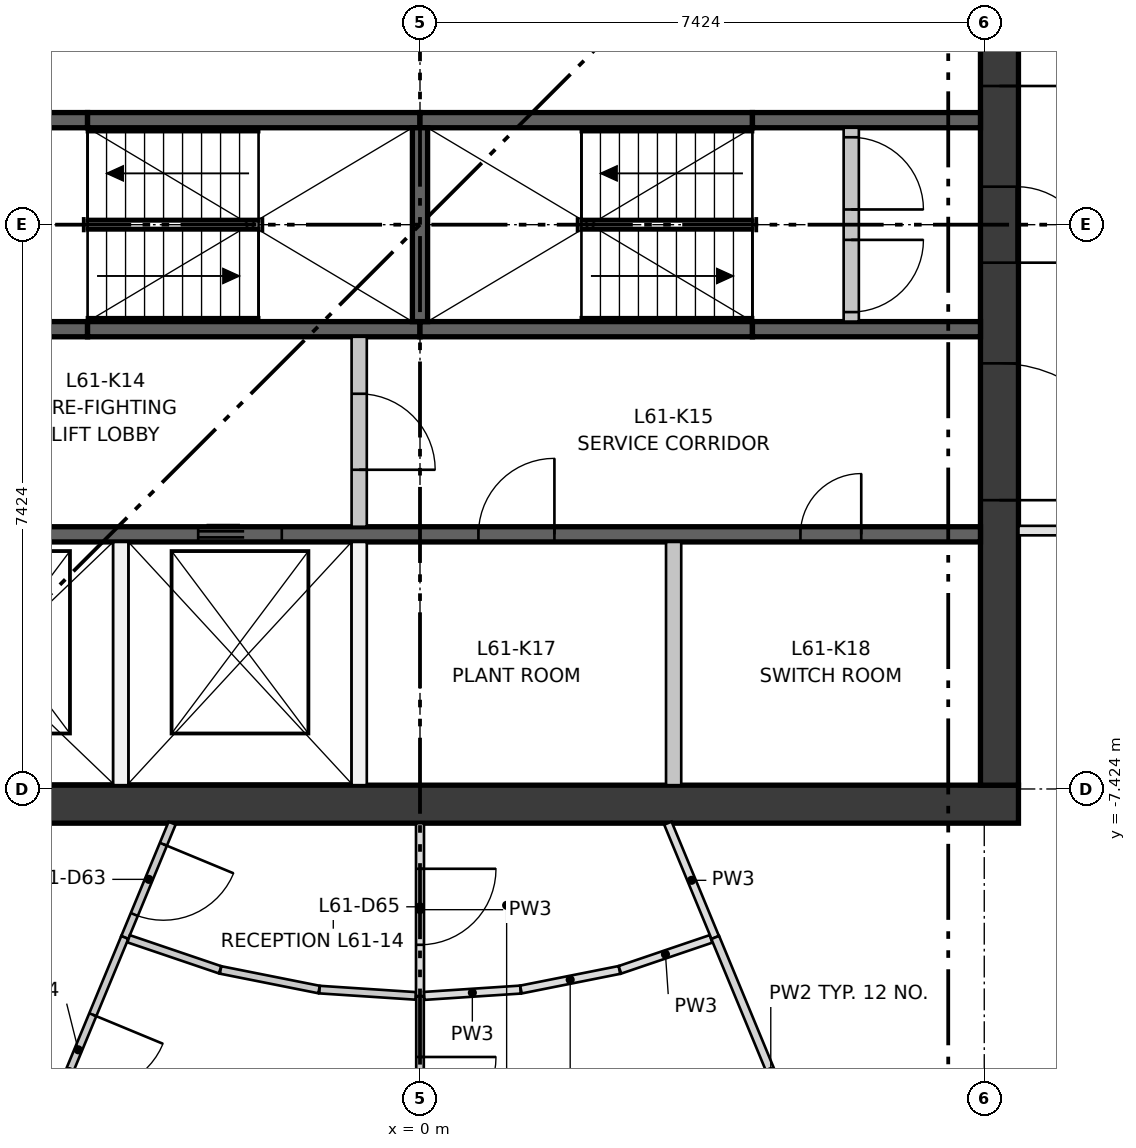
"""IFC4 building model, lengths in metres.
Left out: names, types, materials, properties, quantities, classifications, styles, units other than length and angle.
Written with IfcOpenShell. Run it as: python <this file> out.ifc"""

import sys

from ifc_helpers import new_model, si_unit, direction, frame, frame_2d, origin, place, context, subcontext, project, spatial, polyline, rectangle, outline, extrude, element, fill, save


model = new_model("IFC4")
c1 = context("Model", 3, precision=1e-05, world=origin(), true_north=direction((0.0, 1.0)))
c2 = subcontext(c1, "Body", "Model", "MODEL_VIEW")
j1 = project(units=[si_unit("LENGTHUNIT", "METRE"), si_unit("PLANEANGLEUNIT", "RADIAN")], contexts=[c1])
p1 = place(None, origin())
s1 = spatial("IfcSite", under=j1, at=p1, CompositionType="ELEMENT")
p2 = place(p1, origin())
s2 = spatial("IfcBuilding", under=s1, at=p2, CompositionType="ELEMENT")
p3 = place(p2, frame((0.0, 0.0, 224.5)))
s3 = spatial("IfcBuildingStorey", under=s2, at=p3, CompositionType="ELEMENT", Elevation=224.5)
p4 = place(p3, frame((-7.874, -7.624, 0.0), z_axis=(0.0, 0.0, 1.0), x_axis=(1.0, 0.0, 0.0)))
e1 = element("IfcWall", 1, at=p4, inside=s3, PredefinedType="SHEAR", context=c2, shape_type="SweptSolid", body=[
    extrude(rectangle(XDim=15.748, YDim=0.5, at=frame_2d((7.874, 0.0))), origin(), (0.0, 0.0, 1.0), 3.35),
])
p5 = place(p3, frame((7.624, -7.374, 0.0), z_axis=(0.0, 0.0, 1.0), x_axis=(0.0, 1.0, 0.0)))
e2 = element("IfcWall", 2, at=p5, inside=s3, PredefinedType="SHEAR", context=c2, shape_type="SweptSolid", body=[
    extrude(rectangle(XDim=14.748, YDim=0.5, at=frame_2d((7.374, 0.0))), origin(), (0.0, 0.0, 1.0), 3.35),
])
p6 = place(p5, frame((6.874, 0.0, 0.0)))
e3 = element("IfcOpeningElement", 3, at=p6, cuts=e2, PredefinedType="OPENING", context=c2, shape_type="SweptSolid", body=[
    extrude(rectangle(XDim=1.0, YDim=2.1, at=frame_2d((0.5, 1.05))), frame((0.0, 0.26, 0.0), z_axis=(0.0, -1.0, 0.0), x_axis=(1.0, 0.0, 0.0)), (0.0, 0.0, 1.0), 0.52),
])
p7 = place(p5, frame((3.75, 0.0, 0.0)))
e4 = element("IfcOpeningElement", 4, at=p7, cuts=e2, PredefinedType="OPENING", context=c2, shape_type="SweptSolid", body=[
    extrude(rectangle(XDim=1.8, YDim=2.1, at=frame_2d((0.9, 1.05))), frame((0.0, 0.26, 0.0), z_axis=(0.0, -1.0, 0.0), x_axis=(1.0, 0.0, 0.0)), (0.0, 0.0, 1.0), 0.52),
])
p8 = place(p5, frame((9.198, 0.0, 0.0)))
e5 = element("IfcOpeningElement", 5, at=p8, cuts=e2, PredefinedType="OPENING", context=c2, shape_type="SweptSolid", body=[
    extrude(rectangle(XDim=1.8, YDim=2.1, at=frame_2d((0.9, 1.05))), frame((0.0, 0.26, 0.0), z_axis=(0.0, -1.0, 0.0), x_axis=(1.0, 0.0, 0.0)), (0.0, 0.0, 1.0), 0.52),
])
p9 = place(p3, frame((-7.374, -4.074, 0.0), z_axis=(0.0, 0.0, 1.0), x_axis=(1.0, 0.0, 0.0)))
e6 = element("IfcWall", 6, at=p9, inside=s3, PredefinedType="SHEAR", context=c2, shape_type="SweptSolid", body=[
    extrude(rectangle(XDim=14.748, YDim=0.2, at=frame_2d((7.374, 0.0))), origin(), (0.0, 0.0, 1.0), 3.0),
])
p10 = place(p9, frame((1.319, 0.0, 0.0)))
e7 = element("IfcOpeningElement", 7, at=p10, cuts=e6, PredefinedType="OPENING", context=c2, shape_type="SweptSolid", body=[
    extrude(rectangle(XDim=1.1, YDim=2.1, at=frame_2d((0.55, 1.05))), frame((0.0, 0.11, 0.0), z_axis=(0.0, -1.0, 0.0), x_axis=(1.0, 0.0, 0.0)), (0.0, 0.0, 1.0), 0.22),
])
p11 = place(p9, frame((4.456, 0.0, 0.0)))
e8 = element("IfcOpeningElement", 8, at=p11, cuts=e6, PredefinedType="OPENING", context=c2, shape_type="SweptSolid", body=[
    extrude(rectangle(XDim=1.1, YDim=2.1, at=frame_2d((0.55, 1.05))), frame((0.0, 0.11, 0.0), z_axis=(0.0, -1.0, 0.0), x_axis=(1.0, 0.0, 0.0)), (0.0, 0.0, 1.0), 0.22),
])
p12 = place(p9, frame((8.143, 0.0, 0.0)))
e9 = element("IfcOpeningElement", 9, at=p12, cuts=e6, PredefinedType="OPENING", context=c2, shape_type="SweptSolid", body=[
    extrude(rectangle(XDim=1.0, YDim=2.1, at=frame_2d((0.5, 1.05))), frame((0.0, 0.11, 0.0), z_axis=(0.0, -1.0, 0.0), x_axis=(1.0, 0.0, 0.0)), (0.0, 0.0, 1.0), 0.22),
])
p13 = place(p9, frame((12.379, 0.0, 0.0)))
e10 = element("IfcOpeningElement", 10, at=p13, cuts=e6, PredefinedType="OPENING", context=c2, shape_type="SweptSolid", body=[
    extrude(rectangle(XDim=0.8, YDim=2.1, at=frame_2d((0.4, 1.05))), frame((0.0, 0.11, 0.0), z_axis=(0.0, -1.0, 0.0), x_axis=(1.0, 0.0, 0.0)), (0.0, 0.0, 1.0), 0.22),
])
p14 = place(p3, frame((-7.374, -1.375, 0.0), z_axis=(0.0, 0.0, 1.0), x_axis=(1.0, 0.0, 0.0)))
e11 = element("IfcWall", 11, at=p14, inside=s3, PredefinedType="SHEAR", context=c2, shape_type="SweptSolid", body=[
    extrude(rectangle(XDim=3.0, YDim=0.2, at=frame_2d((1.5, 0.0))), origin(), (0.0, 0.0, 1.0), 3.0),
])
for number, where, z_axis, x_axis in (
    (12, (-4.374, -1.375, 0.0), (0.0, 0.0, 1.0), (1.0, 0.0, 0.0)),
    (13, (0.0, -1.375, 0.0), (0.0, 0.0, 1.0), (1.0, 0.0, 0.0)),
):
    element("IfcWall", number, at=place(p3, frame(where, z_axis=z_axis, x_axis=x_axis)), inside=s3, PredefinedType="SHEAR", context=c2, shape_type="SweptSolid", body=[
        extrude(rectangle(XDim=4.374, YDim=0.2, at=frame_2d((2.187, 0.0))), origin(), (0.0, 0.0, 1.0), 3.0),
    ])
for number, where, z_axis, x_axis in (
    (14, (4.374, -1.375, 0.0), (0.0, 0.0, 1.0), (1.0, 0.0, 0.0)),
    (15, (-7.374, 1.375, 0.0), (0.0, 0.0, 1.0), (1.0, 0.0, 0.0)),
):
    element("IfcWall", number, at=place(p3, frame(where, z_axis=z_axis, x_axis=x_axis)), inside=s3, PredefinedType="SHEAR", context=c2, shape_type="SweptSolid", body=[
        extrude(rectangle(XDim=3.0, YDim=0.2, at=frame_2d((1.5, 0.0))), origin(), (0.0, 0.0, 1.0), 3.0),
    ])
for number, where, z_axis, x_axis in (
    (16, (-4.374, 1.375, 0.0), (0.0, 0.0, 1.0), (1.0, 0.0, 0.0)),
    (17, (0.0, 1.375, 0.0), (0.0, 0.0, 1.0), (1.0, 0.0, 0.0)),
):
    element("IfcWall", number, at=place(p3, frame(where, z_axis=z_axis, x_axis=x_axis)), inside=s3, PredefinedType="SHEAR", context=c2, shape_type="SweptSolid", body=[
        extrude(rectangle(XDim=4.374, YDim=0.2, at=frame_2d((2.187, 0.0))), origin(), (0.0, 0.0, 1.0), 3.0),
    ])
p15 = place(p3, frame((4.374, 1.375, 0.0), z_axis=(0.0, 0.0, 1.0), x_axis=(1.0, 0.0, 0.0)))
e18 = element("IfcWall", 18, at=p15, inside=s3, PredefinedType="SHEAR", context=c2, shape_type="SweptSolid", body=[
    extrude(rectangle(XDim=3.0, YDim=0.2, at=frame_2d((1.5, 0.0))), origin(), (0.0, 0.0, 1.0), 3.0),
])
p16 = place(p3, frame((0.0, -1.275, 0.0), z_axis=(0.0, 0.0, 1.0), x_axis=(0.0, 1.0, 0.0)))
e19 = element("IfcWall", 19, at=p16, inside=s3, PredefinedType="SHEAR", context=c2, shape_type="SweptSolid", body=[
    extrude(rectangle(XDim=2.55, YDim=0.2, at=frame_2d((1.275, 0.0))), origin(), (0.0, 0.0, 1.0), 3.0),
])
for number, where, z_axis, x_axis in (
    (20, (-3.937, -7.374, 0.0), (0.0, 0.0, 1.0), (0.0, 1.0, 0.0)),
    (21, (-0.8, -7.374, 0.0), (0.0, 0.0, 1.0), (0.0, 1.0, 0.0)),
):
    element("IfcWall", number, at=place(p3, frame(where, z_axis=z_axis, x_axis=x_axis)), inside=s3, PredefinedType="PARTITIONING", context=c2, shape_type="SweptSolid", body=[
        extrude(rectangle(XDim=3.2, YDim=0.2, at=frame_2d((1.6, 0.0))), origin(), (0.0, 0.0, 1.0), 3.0),
    ])
p17 = place(p3, frame((-0.8, -3.974, 0.0), z_axis=(0.0, 0.0, 1.0), x_axis=(0.0, 1.0, 0.0)))
e22 = element("IfcWall", 22, at=p17, inside=s3, PredefinedType="PARTITIONING", context=c2, shape_type="SweptSolid", body=[
    extrude(rectangle(XDim=2.499, YDim=0.2, at=frame_2d((1.25, 0.0))), origin(), (0.0, 0.0, 1.0), 3.0),
])
p18 = place(p17, frame((0.75, 0.0, 0.0)))
e23 = element("IfcOpeningElement", 23, at=p18, cuts=e22, PredefinedType="OPENING", context=c2, shape_type="SweptSolid", body=[
    extrude(rectangle(XDim=1.0, YDim=2.1, at=frame_2d((0.5, 1.05))), frame((0.0, 0.11, 0.0), z_axis=(0.0, -1.0, 0.0), x_axis=(1.0, 0.0, 0.0)), (0.0, 0.0, 1.0), 0.22),
])
p19 = place(p3, frame((3.337, -7.374, 0.0), z_axis=(0.0, 0.0, 1.0), x_axis=(0.0, 1.0, 0.0)))
e24 = element("IfcWall", 24, at=p19, inside=s3, PredefinedType="PARTITIONING", context=c2, shape_type="SweptSolid", body=[
    extrude(rectangle(XDim=3.2, YDim=0.2, at=frame_2d((1.6, 0.0))), origin(), (0.0, 0.0, 1.0), 3.0),
])
p20 = place(p3, frame((5.674, -1.275, 0.0), z_axis=(0.0, 0.0, 1.0), x_axis=(0.0, 1.0, 0.0)))
e25 = element("IfcWall", 25, at=p20, inside=s3, PredefinedType="PARTITIONING", context=c2, shape_type="SweptSolid", body=[
    extrude(rectangle(XDim=2.55, YDim=0.2, at=frame_2d((1.275, 0.0))), origin(), (0.0, 0.0, 1.0), 3.0),
])
p21 = place(p20, frame((0.125, 0.0, 0.0)))
e26 = element("IfcOpeningElement", 26, at=p21, cuts=e25, PredefinedType="OPENING", context=c2, shape_type="SweptSolid", body=[
    extrude(rectangle(XDim=0.95, YDim=2.1, at=frame_2d((0.475, 1.05))), frame((0.0, 0.11, 0.0), z_axis=(0.0, -1.0, 0.0), x_axis=(1.0, 0.0, 0.0)), (0.0, 0.0, 1.0), 0.22),
])
p22 = place(p20, frame((1.475, 0.0, 0.0)))
e27 = element("IfcOpeningElement", 27, at=p22, cuts=e25, PredefinedType="OPENING", context=c2, shape_type="SweptSolid", body=[
    extrude(rectangle(XDim=0.95, YDim=2.1, at=frame_2d((0.475, 1.05))), frame((0.0, 0.11, 0.0), z_axis=(0.0, -1.0, 0.0), x_axis=(1.0, 0.0, 0.0)), (0.0, 0.0, 1.0), 0.22),
])
p23 = place(p3, frame((8.643, -12.934, 0.0), z_axis=(0.619832994913, -0.755344730477, 0.212747259813), x_axis=(0.77304293478, 0.634353703321, -8.415613e-06)))
e28 = element("IfcWall", 28, at=p23, inside=s3, PredefinedType="SOLIDWALL", context=c2, shape_type="SweptSolid", body=[
    extrude(outline(polyline([(0.0, 0.0), (2.594, 0.0), (2.575, 0.921), (0.019, 0.921), (0.0, 0.0)])), origin(), (0.0, 0.0, -1.0), 0.3),
])
p24 = place(p3, frame((10.191, -4.024, 0.0), z_axis=(0.0, 0.0, 1.0), x_axis=(-1.0, 0.0, 0.0)))
e29 = element("IfcWall", 29, at=p24, inside=s3, PredefinedType="PARTITIONING", context=c2, shape_type="SweptSolid", body=[
    extrude(rectangle(XDim=2.317, YDim=0.125, at=frame_2d((1.158, 0.0))), origin(), (0.0, 0.0, 1.0), 3.0),
])
p25 = place(p24, frame((0.7, 0.0, 0.0)))
e30 = element("IfcOpeningElement", 30, at=p25, cuts=e29, PredefinedType="OPENING", context=c2, shape_type="SweptSolid", body=[
    extrude(rectangle(XDim=1.0, YDim=2.1, at=frame_2d((0.5, 1.05))), frame((0.0, 0.073, 0.0), z_axis=(0.0, -1.0, 0.0), x_axis=(1.0, 0.0, 0.0)), (0.0, 0.0, 1.0), 0.145),
])
p26 = place(p3, frame((-3.261, -7.874, 0.0), z_axis=(0.0, 0.0, 1.0), x_axis=(-0.382718376354, -0.923865057463, 0.0)))
e31 = element("IfcWall", 31, at=p26, inside=s3, PredefinedType="PARTITIONING", context=c2, shape_type="SweptSolid", body=[
    extrude(rectangle(XDim=1.627, YDim=0.1, at=frame_2d((0.813, 0.0))), origin(), (0.0, 0.0, 1.0), 3.0),
])
p27 = place(p26, frame((0.3, 0.0, 0.0)))
e32 = element("IfcOpeningElement", 32, at=p27, cuts=e31, PredefinedType="OPENING", context=c2, shape_type="SweptSolid", body=[
    extrude(rectangle(XDim=1.0, YDim=2.1, at=frame_2d((0.5, 1.05))), frame((0.0, 0.06, 0.0), z_axis=(0.0, -1.0, 0.0), x_axis=(1.0, 0.0, 0.0)), (0.0, 0.0, 1.0), 0.12),
])
p28 = place(p3, frame((-3.884, -9.377, 0.0), z_axis=(0.0, 0.0, 1.0), x_axis=(-0.382713052283, -0.923867262983, 0.0)))
e33 = element("IfcWall", 33, at=p28, inside=s3, PredefinedType="PARTITIONING", context=c2, shape_type="SweptSolid", body=[
    extrude(rectangle(XDim=3.82, YDim=0.1, at=frame_2d((1.91, 0.0))), origin(), (0.0, 0.0, 1.0), 3.0),
])
p29 = place(p28, frame((1.1, 0.0, 0.0)))
e34 = element("IfcOpeningElement", 34, at=p29, cuts=e33, PredefinedType="OPENING", context=c2, shape_type="SweptSolid", body=[
    extrude(rectangle(XDim=1.0, YDim=2.1, at=frame_2d((0.5, 1.05))), frame((0.0, 0.06, 0.0), z_axis=(0.0, -1.0, 0.0), x_axis=(1.0, 0.0, 0.0)), (0.0, 0.0, 1.0), 0.12),
])
p30 = place(p3, frame((-2.63, -9.803, 0.0), z_axis=(0.0, 0.0, 1.0), x_axis=(-0.946940072487, 0.321410172706, 0.0)))
e35 = element("IfcWall", 35, at=p30, inside=s3, PredefinedType="PARTITIONING", context=c2, shape_type="SweptSolid", body=[
    extrude(rectangle(XDim=1.271, YDim=0.1, at=frame_2d((0.635, 0.0))), origin(), (0.0, 0.0, 1.0), 3.0),
])
p31 = place(p3, frame((-1.328, -10.062, 0.0), z_axis=(0.0, 0.0, 1.0), x_axis=(-0.980779158075, 0.195121098517, 0.0)))
e36 = element("IfcWall", 36, at=p31, inside=s3, PredefinedType="PARTITIONING", context=c2, shape_type="SweptSolid", body=[
    extrude(rectangle(XDim=1.321, YDim=0.1, at=frame_2d((0.661, 0.0))), origin(), (0.0, 0.0, 1.0), 3.0),
])
p32 = place(p3, frame((-0.056, -10.146, 0.0), z_axis=(0.0, 0.0, 1.0), x_axis=(-0.997868677089, 0.065254143814, 0.0)))
e37 = element("IfcWall", 37, at=p32, inside=s3, PredefinedType="PARTITIONING", context=c2, shape_type="SweptSolid", body=[
    extrude(rectangle(XDim=1.268, YDim=0.1, at=frame_2d((0.634, 0.0))), origin(), (0.0, 0.0, 1.0), 3.0),
])
p33 = place(p3, frame((0.0, -7.874, 0.0), z_axis=(0.0, 0.0, 1.0), x_axis=(0.0, -1.0, 0.0)))
e38 = element("IfcWall", 38, at=p33, inside=s3, PredefinedType="PARTITIONING", context=c2, shape_type="SweptSolid", body=[
    extrude(rectangle(XDim=2.276, YDim=0.105, at=frame_2d((1.138, 0.0))), origin(), (0.0, 0.0, 1.0), 3.0),
])
p34 = place(p33, frame((0.6, 0.0, 0.0)))
e39 = element("IfcOpeningElement", 39, at=p34, cuts=e38, PredefinedType="OPENING", context=c2, shape_type="SweptSolid", body=[
    extrude(rectangle(XDim=1.0, YDim=2.1, at=frame_2d((0.5, 1.05))), frame((0.0, 0.062, 0.0), z_axis=(0.0, -1.0, 0.0), x_axis=(1.0, 0.0, 0.0)), (0.0, 0.0, 1.0), 0.125),
])
p35 = place(p3, frame((0.0, -10.15, 0.0), z_axis=(0.0, 0.0, 1.0), x_axis=(0.0, -1.0, 0.0)))
e40 = element("IfcWall", 40, at=p35, inside=s3, PredefinedType="PARTITIONING", context=c2, shape_type="SweptSolid", body=[
    extrude(rectangle(XDim=3.82, YDim=0.1, at=frame_2d((1.91, 0.0))), origin(), (0.0, 0.0, 1.0), 3.0),
])
p36 = place(p35, frame((0.8, 0.0, 0.0)))
e41 = element("IfcOpeningElement", 41, at=p36, cuts=e40, PredefinedType="OPENING", context=c2, shape_type="SweptSolid", body=[
    extrude(rectangle(XDim=1.0, YDim=2.1, at=frame_2d((0.5, 1.05))), frame((0.0, 0.06, 0.0), z_axis=(0.0, -1.0, 0.0), x_axis=(1.0, 0.0, 0.0)), (0.0, 0.0, 1.0), 0.12),
])
p37 = place(p3, frame((1.321, -10.063, 0.0), z_axis=(0.0, 0.0, 1.0), x_axis=(-0.99786785721, -0.065266680223, 0.0)))
e42 = element("IfcWall", 42, at=p37, inside=s3, PredefinedType="PARTITIONING", context=c2, shape_type="SweptSolid", body=[
    extrude(rectangle(XDim=1.268, YDim=0.105, at=frame_2d((0.634, 0.0))), origin(), (0.0, 0.0, 1.0), 3.0),
])
p38 = place(p3, frame((2.624, -9.805, 0.0), z_axis=(0.0, 0.0, 1.0), x_axis=(-0.980765080918, -0.195191844223, 0.0)))
e43 = element("IfcWall", 43, at=p38, inside=s3, PredefinedType="PARTITIONING", context=c2, shape_type="SweptSolid", body=[
    extrude(rectangle(XDim=1.321, YDim=0.105, at=frame_2d((0.66, 0.0))), origin(), (0.0, 0.0, 1.0), 3.0),
])
p39 = place(p3, frame((3.829, -9.396, 0.0), z_axis=(0.0, 0.0, 1.0), x_axis=(-0.946932566751, -0.321432285291, 0.0)))
e44 = element("IfcWall", 44, at=p39, inside=s3, PredefinedType="PARTITIONING", context=c2, shape_type="SweptSolid", body=[
    extrude(rectangle(XDim=1.265, YDim=0.105, at=frame_2d((0.633, 0.0))), origin(), (0.0, 0.0, 1.0), 3.0),
])
p40 = place(p3, frame((3.261, -7.874, 0.0), z_axis=(0.0, 0.0, 1.0), x_axis=(0.382718376354, -0.923865057463, 0.0)))
e45 = element("IfcWall", 45, at=p40, inside=s3, PredefinedType="PARTITIONING", context=c2, shape_type="SweptSolid", body=[
    extrude(rectangle(XDim=1.627, YDim=0.105, at=frame_2d((0.813, 0.0))), origin(), (0.0, 0.0, 1.0), 3.0),
])
p41 = place(p3, frame((3.884, -9.377, 0.0), z_axis=(0.0, 0.0, 1.0), x_axis=(0.382713052283, -0.923867262983, 0.0)))
e46 = element("IfcWall", 46, at=p41, inside=s3, PredefinedType="PARTITIONING", context=c2, shape_type="SweptSolid", body=[
    extrude(rectangle(XDim=3.82, YDim=0.11, at=frame_2d((1.91, 0.0))), origin(), (0.0, 0.0, 1.0), 3.0),
])
p42 = place(p11, origin())
e47 = element("IfcDoor", 47, at=p42, inside=s3, OperationType="DOUBLE_DOOR_SLIDING", PredefinedType="DOOR", context=c2, shape_type="SweptSolid", body=[
    extrude(rectangle(XDim=1.1, YDim=2.1, at=frame_2d((0.55, 1.05))), frame((0.0, 0.025, 0.0), z_axis=(0.0, -1.0, 0.0), x_axis=(1.0, 0.0, 0.0)), (0.0, 0.0, 1.0), 0.05),
])
fill(e8, e47)
p43 = place(p21, frame((0.95, 0.0, 0.0), z_axis=(0.0, 0.0, 1.0), x_axis=(-1.0, 0.0, 0.0)))
e48 = element("IfcDoor", 48, at=p43, inside=s3, OperationType="SINGLE_SWING_RIGHT", PredefinedType="DOOR", context=c2, shape_type="SweptSolid", body=[
    extrude(rectangle(XDim=0.95, YDim=2.1, at=frame_2d((0.475, 1.05))), frame((0.0, 0.025, 0.0), z_axis=(0.0, -1.0, 0.0), x_axis=(1.0, 0.0, 0.0)), (0.0, 0.0, 1.0), 0.05),
])
fill(e26, e48)
p44 = place(p22, frame((0.95, 0.0, 0.0), z_axis=(0.0, 0.0, 1.0), x_axis=(-1.0, 0.0, 0.0)))
e49 = element("IfcDoor", 49, at=p44, inside=s3, OperationType="SINGLE_SWING_LEFT", PredefinedType="DOOR", context=c2, shape_type="SweptSolid", body=[
    extrude(rectangle(XDim=0.95, YDim=2.1, at=frame_2d((0.475, 1.05))), frame((0.0, 0.025, 0.0), z_axis=(0.0, -1.0, 0.0), x_axis=(1.0, 0.0, 0.0)), (0.0, 0.0, 1.0), 0.05),
])
fill(e27, e49)
p45 = place(p18, frame((1.0, 0.0, 0.0), z_axis=(0.0, 0.0, 1.0), x_axis=(-1.0, 0.0, 0.0)))
e50 = element("IfcDoor", 50, at=p45, inside=s3, OperationType="SINGLE_SWING_LEFT", PredefinedType="DOOR", context=c2, shape_type="SweptSolid", body=[
    extrude(rectangle(XDim=1.0, YDim=2.1, at=frame_2d((0.5, 1.05))), frame((0.0, 0.025, 0.0), z_axis=(0.0, -1.0, 0.0), x_axis=(1.0, 0.0, 0.0)), (0.0, 0.0, 1.0), 0.05),
])
fill(e23, e50)
p46 = place(p12, origin())
e51 = element("IfcDoor", 51, at=p46, inside=s3, OperationType="SINGLE_SWING_RIGHT", PredefinedType="DOOR", context=c2, shape_type="SweptSolid", body=[
    extrude(rectangle(XDim=1.0, YDim=2.1, at=frame_2d((0.5, 1.05))), frame((0.0, 0.025, 0.0), z_axis=(0.0, -1.0, 0.0), x_axis=(1.0, 0.0, 0.0)), (0.0, 0.0, 1.0), 0.05),
])
fill(e9, e51)
p47 = place(p13, origin())
e52 = element("IfcDoor", 52, at=p47, inside=s3, OperationType="SINGLE_SWING_RIGHT", PredefinedType="DOOR", context=c2, shape_type="SweptSolid", body=[
    extrude(rectangle(XDim=0.8, YDim=2.1, at=frame_2d((0.4, 1.05))), frame((0.0, 0.025, 0.0), z_axis=(0.0, -1.0, 0.0), x_axis=(1.0, 0.0, 0.0)), (0.0, 0.0, 1.0), 0.05),
])
fill(e10, e52)
p48 = place(p6, frame((1.0, 0.0, 0.0), z_axis=(0.0, 0.0, 1.0), x_axis=(-1.0, 0.0, 0.0)))
e53 = element("IfcDoor", 53, at=p48, inside=s3, OperationType="SINGLE_SWING_LEFT", PredefinedType="DOOR", context=c2, shape_type="SweptSolid", body=[
    extrude(rectangle(XDim=1.0, YDim=2.1, at=frame_2d((0.5, 1.05))), frame((0.0, 0.25, 0.0), z_axis=(0.0, -1.0, 0.0), x_axis=(1.0, 0.0, 0.0)), (0.0, 0.0, 1.0), 0.05),
])
fill(e3, e53)
p49 = place(p7, frame((1.8, 0.0, 0.0), z_axis=(0.0, 0.0, 1.0), x_axis=(-1.0, 0.0, 0.0)))
e54 = element("IfcDoor", 54, at=p49, inside=s3, OperationType="DOUBLE_DOOR_SINGLE_SWING", PredefinedType="DOOR", context=c2, shape_type="SweptSolid", body=[
    extrude(rectangle(XDim=1.8, YDim=2.1, at=frame_2d((0.9, 1.05))), frame((0.0, 0.025, 0.0), z_axis=(0.0, -1.0, 0.0), x_axis=(1.0, 0.0, 0.0)), (0.0, 0.0, 1.0), 0.05),
])
fill(e4, e54)
p50 = place(p8, frame((1.8, 0.0, 0.0), z_axis=(0.0, 0.0, 1.0), x_axis=(-1.0, 0.0, 0.0)))
e55 = element("IfcDoor", 55, at=p50, inside=s3, OperationType="DOUBLE_DOOR_SINGLE_SWING", PredefinedType="DOOR", context=c2, shape_type="SweptSolid", body=[
    extrude(rectangle(XDim=1.8, YDim=2.1, at=frame_2d((0.9, 1.05))), frame((0.0, 0.025, 0.0), z_axis=(0.0, -1.0, 0.0), x_axis=(1.0, 0.0, 0.0)), (0.0, 0.0, 1.0), 0.05),
])
fill(e5, e55)
p51 = place(p27, origin())
e56 = element("IfcDoor", 56, at=p51, inside=s3, OperationType="SINGLE_SWING_LEFT", PredefinedType="DOOR", context=c2, shape_type="SweptSolid", body=[
    extrude(rectangle(XDim=1.0, YDim=2.1, at=frame_2d((0.5, 1.05))), frame((0.0, 0.025, 0.0), z_axis=(0.0, -1.0, 0.0), x_axis=(1.0, 0.0, 0.0)), (0.0, 0.0, 1.0), 0.05),
])
fill(e32, e56)
p52 = place(p29, origin())
e57 = element("IfcDoor", 57, at=p52, inside=s3, OperationType="SINGLE_SWING_LEFT", PredefinedType="DOOR", context=c2, shape_type="SweptSolid", body=[
    extrude(rectangle(XDim=1.0, YDim=2.1, at=frame_2d((0.5, 1.05))), frame((0.0, 0.025, 0.0), z_axis=(0.0, -1.0, 0.0), x_axis=(1.0, 0.0, 0.0)), (0.0, 0.0, 1.0), 0.05),
])
fill(e34, e57)
p53 = place(p34, origin())
e58 = element("IfcDoor", 58, at=p53, inside=s3, OperationType="SINGLE_SWING_LEFT", PredefinedType="DOOR", context=c2, shape_type="SweptSolid", body=[
    extrude(rectangle(XDim=1.0, YDim=2.1, at=frame_2d((0.5, 1.05))), frame((0.0, 0.025, 0.0), z_axis=(0.0, -1.0, 0.0), x_axis=(1.0, 0.0, 0.0)), (0.0, 0.0, 1.0), 0.05),
])
fill(e39, e58)
p54 = place(p36, origin())
e59 = element("IfcDoor", 59, at=p54, inside=s3, OperationType="SINGLE_SWING_LEFT", PredefinedType="DOOR", context=c2, shape_type="SweptSolid", body=[
    extrude(rectangle(XDim=1.0, YDim=2.1, at=frame_2d((0.5, 1.05))), frame((0.0, 0.025, 0.0), z_axis=(0.0, -1.0, 0.0), x_axis=(1.0, 0.0, 0.0)), (0.0, 0.0, 1.0), 0.05),
])
fill(e41, e59)
save(model, sys.argv[1])
